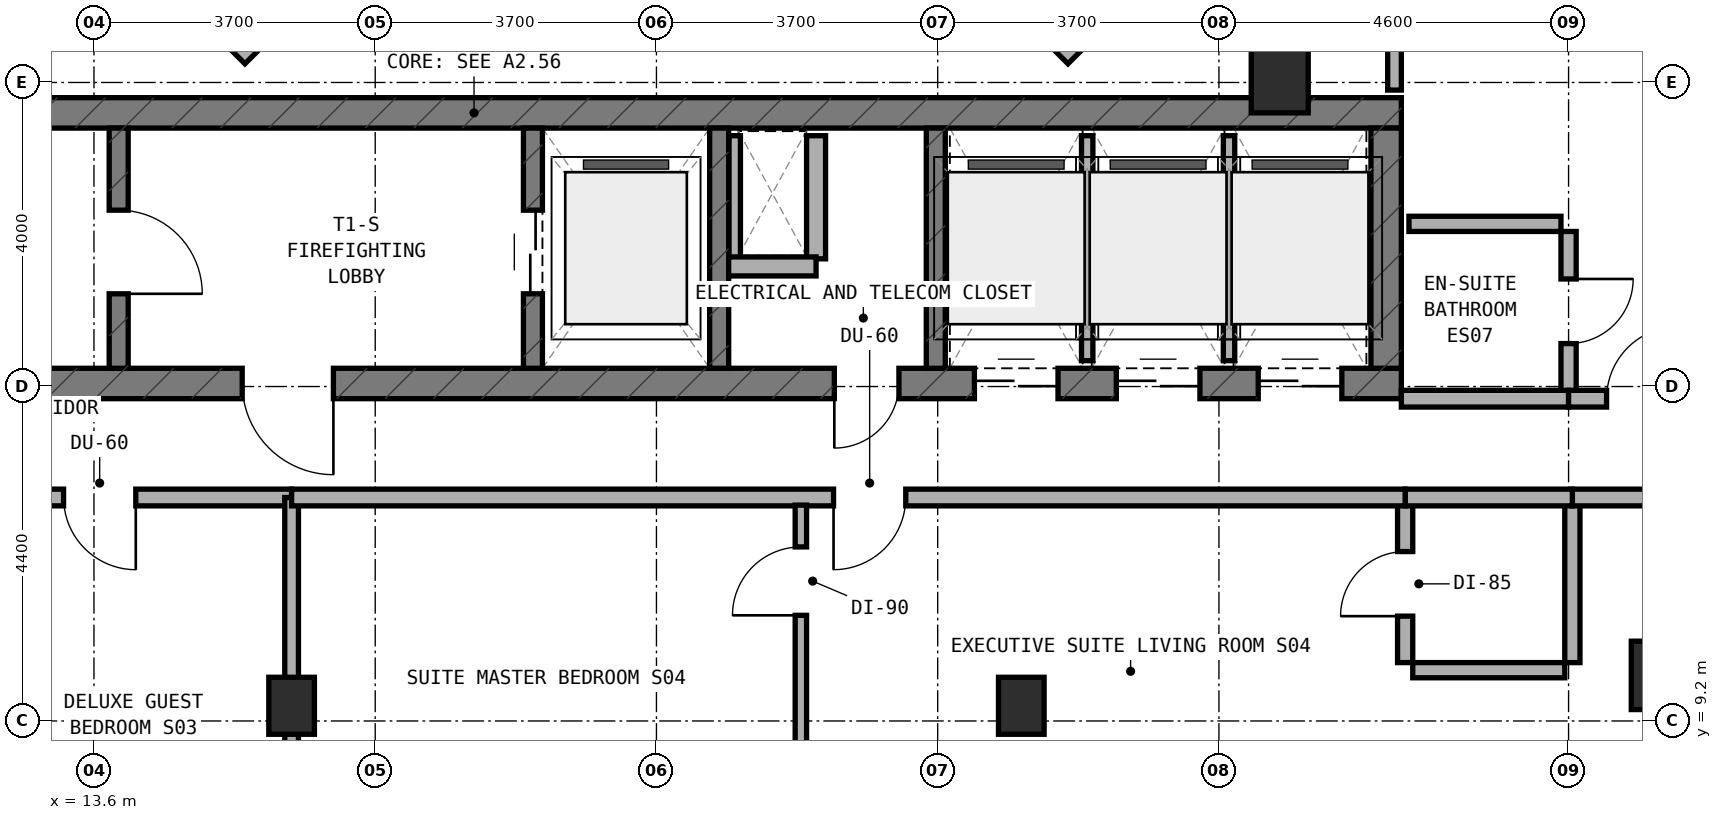
"""IFC4 building model, lengths in metres.
Left out: names, types, materials, properties, quantities, classifications, styles, units other than length and angle.
Written with IfcOpenShell. Run it as: python <this file> out.ifc"""

import sys

from ifc_helpers import new_model, si_unit, direction, frame, frame_2d, origin, origin_2d, place, context, subcontext, project, spatial, rectangle, extrude, element, fill, save


model = new_model("IFC4")
c1 = context("Model", 3, precision=1e-05, world=origin(), true_north=direction((0.0, 1.0)))
c2 = subcontext(c1, "Body", "Model", "MODEL_VIEW")
j1 = project(units=[si_unit("LENGTHUNIT", "METRE"), si_unit("PLANEANGLEUNIT", "RADIAN")], contexts=[c1])
p1 = place(None, origin())
s1 = spatial("IfcSite", under=j1, at=p1, CompositionType="ELEMENT")
p2 = place(p1, origin())
s2 = spatial("IfcBuilding", under=s1, at=p2, CompositionType="ELEMENT")
p3 = place(p2, frame((0.0, 0.0, 257.6)))
s3 = spatial("IfcBuildingStorey", under=s2, at=p3, CompositionType="ELEMENT", Elevation=257.6)
p4 = place(p3, frame((6.4, 13.64, 0.0), z_axis=(0.0, 0.0, 1.0), x_axis=(1.0, 0.0, 0.0)))
e1 = element("IfcWall", 1, at=p4, inside=s3, PredefinedType="SHEAR", context=c2, shape_type="SweptSolid", body=[
    extrude(rectangle(XDim=24.4, YDim=0.4, at=frame_2d((12.2, 0.0))), origin(), (0.0, 0.0, 1.0), 3.6),
])
p5 = place(p4, frame((9.15, 0.0, 0.0)))
e2 = element("IfcOpeningElement", 2, at=p5, cuts=e1, PredefinedType="OPENING", context=c2, shape_type="SweptSolid", body=[
    extrude(rectangle(XDim=1.2, YDim=2.15, at=frame_2d((0.6, 1.075))), frame((0.0, 0.21, 0.0), z_axis=(0.0, -1.0, 0.0), x_axis=(1.0, 0.0, 0.0)), (0.0, 0.0, 1.0), 0.42),
])
p6 = place(p4, frame((16.94, 0.0, 0.0)))
e3 = element("IfcOpeningElement", 3, at=p6, cuts=e1, PredefinedType="OPENING", context=c2, shape_type="SweptSolid", body=[
    extrude(rectangle(XDim=0.85, YDim=2.1, at=frame_2d((0.425, 1.05))), frame((0.0, 0.21, 0.0), z_axis=(0.0, -1.0, 0.0), x_axis=(1.0, 0.0, 0.0)), (0.0, 0.0, 1.0), 0.42),
])
p7 = place(p4, frame((18.783, 0.0, 0.0)))
e4 = element("IfcOpeningElement", 4, at=p7, cuts=e1, PredefinedType="OPENING", context=c2, shape_type="SweptSolid", body=[
    extrude(rectangle(XDim=1.1, YDim=2.15, at=frame_2d((0.55, 1.075))), frame((0.0, 0.21, 0.0), z_axis=(0.0, -1.0, 0.0), x_axis=(1.0, 0.0, 0.0)), (0.0, 0.0, 1.0), 0.42),
])
p8 = place(p4, frame((20.65, 0.0, 0.0)))
e5 = element("IfcOpeningElement", 5, at=p8, cuts=e1, PredefinedType="OPENING", context=c2, shape_type="SweptSolid", body=[
    extrude(rectangle(XDim=1.1, YDim=2.15, at=frame_2d((0.55, 1.075))), frame((0.0, 0.21, 0.0), z_axis=(0.0, -1.0, 0.0), x_axis=(1.0, 0.0, 0.0)), (0.0, 0.0, 1.0), 0.42),
])
p9 = place(p4, frame((22.517, 0.0, 0.0)))
e6 = element("IfcOpeningElement", 6, at=p9, cuts=e1, PredefinedType="OPENING", context=c2, shape_type="SweptSolid", body=[
    extrude(rectangle(XDim=1.1, YDim=2.15, at=frame_2d((0.55, 1.075))), frame((0.0, 0.21, 0.0), z_axis=(0.0, -1.0, 0.0), x_axis=(1.0, 0.0, 0.0)), (0.0, 0.0, 1.0), 0.42),
])
p10 = place(p3, frame((6.4, 17.2, 0.0), z_axis=(0.0, 0.0, 1.0), x_axis=(1.0, 0.0, 0.0)))
e7 = element("IfcWall", 7, at=p10, inside=s3, PredefinedType="SHEAR", context=c2, shape_type="SweptSolid", body=[
    extrude(rectangle(XDim=24.4, YDim=0.4, at=frame_2d((12.2, 0.0))), origin(), (0.0, 0.0, 1.0), 3.6),
])
p11 = place(p3, frame((30.6, 13.84, 0.0), z_axis=(0.0, 0.0, 1.0), x_axis=(0.0, 1.0, 0.0)))
e8 = element("IfcWall", 8, at=p11, inside=s3, PredefinedType="SHEAR", context=c2, shape_type="SweptSolid", body=[
    extrude(rectangle(XDim=3.16, YDim=0.4, at=frame_2d((1.58, 0.0))), origin(), (0.0, 0.0, 1.0), 3.6),
])
p12 = place(p3, frame((13.925, 13.84, 0.0), z_axis=(0.0, 0.0, 1.0), x_axis=(0.0, 1.0, 0.0)))
e9 = element("IfcWall", 9, at=p12, inside=s3, PredefinedType="STANDARD", context=c2, shape_type="SweptSolid", body=[
    extrude(rectangle(XDim=3.16, YDim=0.25, at=frame_2d((1.58, 0.0))), origin(), (0.0, 0.0, 1.0), 3.32),
])
p13 = place(p12, frame((0.98, 0.0, 0.0)))
e10 = element("IfcOpeningElement", 10, at=p13, cuts=e9, PredefinedType="OPENING", context=c2, shape_type="SweptSolid", body=[
    extrude(rectangle(XDim=1.1, YDim=2.15, at=frame_2d((0.55, 1.075))), frame((0.0, 0.135, 0.0), z_axis=(0.0, -1.0, 0.0), x_axis=(1.0, 0.0, 0.0)), (0.0, 0.0, 1.0), 0.27),
])
p14 = place(p3, frame((19.375, 13.84, 0.0), z_axis=(0.0, 0.0, 1.0), x_axis=(0.0, 1.0, 0.0)))
e11 = element("IfcWall", 11, at=p14, inside=s3, PredefinedType="STANDARD", context=c2, shape_type="SweptSolid", body=[
    extrude(rectangle(XDim=3.16, YDim=0.25, at=frame_2d((1.58, 0.0))), origin(), (0.0, 0.0, 1.0), 3.32),
])
p15 = place(p14, frame((0.98, 0.0, 0.0)))
e12 = element("IfcOpeningElement", 12, at=p15, cuts=e11, PredefinedType="OPENING", context=c2, shape_type="SweptSolid", body=[
    extrude(rectangle(XDim=1.1, YDim=2.15, at=frame_2d((0.55, 1.075))), frame((0.0, 0.135, 0.0), z_axis=(0.0, -1.0, 0.0), x_axis=(1.0, 0.0, 0.0)), (0.0, 0.0, 1.0), 0.27),
])
for number, where, z_axis, x_axis in (
    (13, (21.825, 13.84, 0.0), (0.0, 0.0, 1.0), (0.0, 1.0, 0.0)),
    (14, (24.675, 13.84, 0.0), (0.0, 0.0, 1.0), (0.0, 1.0, 0.0)),
):
    element("IfcWall", number, at=place(p3, frame(where, z_axis=z_axis, x_axis=x_axis)), inside=s3, PredefinedType="STANDARD", context=c2, shape_type="SweptSolid", body=[
        extrude(rectangle(XDim=3.16, YDim=0.25, at=frame_2d((1.58, 0.0))), origin(), (0.0, 0.0, 1.0), 3.32),
    ])
for number, where, z_axis, x_axis in (
    (15, (16.2, 9.4, 0.0), (0.0, 0.0, 1.0), (1.0, 0.0, 0.0)),
    (16, (25.8, 9.4, 0.0), (0.0, 0.0, 1.0), (1.0, 0.0, 0.0)),
):
    element("IfcColumn", number, at=place(p3, frame(where, z_axis=z_axis, x_axis=x_axis)), inside=s3, PredefinedType="COLUMN", context=c2, shape_type="SweptSolid", body=[
        extrude(rectangle(XDim=0.6, YDim=0.75, at=origin_2d()), origin(), (0.0, 0.0, 1.0), 3.6),
    ])
for number, where, z_axis, x_axis in (
    (17, (34.2, 9.8, 0.0), (0.0, 0.0, 1.0), (1.0, 0.0, 0.0)),
    (18, (29.2, 17.65, 0.0), (0.0, 0.0, 1.0), (1.0, 0.0, 0.0)),
):
    element("IfcColumn", number, at=place(p3, frame(where, z_axis=z_axis, x_axis=x_axis)), inside=s3, PredefinedType="COLUMN", context=c2, shape_type="SweptSolid", body=[
        extrude(rectangle(XDim=0.75, YDim=0.9, at=origin_2d()), origin(), (0.0, 0.0, 1.0), 3.6),
    ])
p16 = place(p3, frame((33.875, 8.728, 0.0), z_axis=(0.0, 0.0, 1.0), x_axis=(0.99139921394, 0.130872451645, 0.0)))
e19 = element("IfcWall", 19, at=p16, inside=s3, PredefinedType="STANDARD", context=c2, shape_type="SweptSolid", body=[
    extrude(rectangle(XDim=0.756, YDim=0.26, at=frame_2d((0.378, 0.0))), origin(), (0.0, 0.0, 1.0), 3.32),
])
for number, where, z_axis, x_axis in (
    (20, (26.322, 17.938, 0.0), (0.0, 0.0, 1.0), (0.707, 0.707, 0.0)),
    (21, (14.044, 19.572, 0.0), (0.0, 0.0, 1.0), (0.707, -0.707, 0.0)),
):
    element("IfcWall", number, at=place(p3, frame(where, z_axis=z_axis, x_axis=x_axis)), inside=s3, PredefinedType="STANDARD", context=c2, shape_type="SweptSolid", body=[
        extrude(rectangle(XDim=2.311, YDim=0.26, at=frame_2d((1.155, 0.0))), origin(), (0.0, 0.0, 1.0), 3.32),
    ])
p17 = place(p3, frame((22.03, 15.28, 0.0), z_axis=(0.0, 0.0, 1.0), x_axis=(0.0, 1.0, 0.0)))
e22 = element("IfcWall", 22, at=p17, inside=s3, PredefinedType="PARTITIONING", context=c2, shape_type="SweptSolid", body=[
    extrude(rectangle(XDim=1.62, YDim=0.15, at=frame_2d((0.81, 0.0))), origin(), (0.0, 0.0, 1.0), 3.32),
])
p18 = place(p3, frame((23.1, 15.28, 0.0), z_axis=(0.0, 0.0, 1.0), x_axis=(0.0, 1.0, 0.0)))
e23 = element("IfcWall", 23, at=p18, inside=s3, PredefinedType="SOLIDWALL", context=c2, shape_type="SweptSolid", body=[
    extrude(rectangle(XDim=1.62, YDim=0.25, at=frame_2d((0.81, 0.0))), origin(), (0.0, 0.0, 1.0), 3.32),
])
p19 = place(p3, frame((21.95, 15.18, 0.0), z_axis=(0.0, 0.0, 1.0), x_axis=(1.0, 0.0, 0.0)))
e24 = element("IfcWall", 24, at=p19, inside=s3, PredefinedType="SOLIDWALL", context=c2, shape_type="SweptSolid", body=[
    extrude(rectangle(XDim=1.15, YDim=0.25, at=frame_2d((0.575, 0.0))), origin(), (0.0, 0.0, 1.0), 3.32),
])
p20 = place(p3, frame((26.667, 13.94, 0.0), z_axis=(0.0, 0.0, 1.0), x_axis=(0.0, 1.0, 0.0)))
e25 = element("IfcWall", 25, at=p20, inside=s3, PredefinedType="PARTITIONING", context=c2, shape_type="SweptSolid", body=[
    extrude(rectangle(XDim=2.96, YDim=0.15, at=frame_2d((1.48, 0.0))), origin(), (0.0, 0.0, 1.0), 3.32),
])
p21 = place(p3, frame((28.533, 13.94, 0.0), z_axis=(0.0, 0.0, 1.0), x_axis=(0.0, 1.0, 0.0)))
e26 = element("IfcWall", 26, at=p21, inside=s3, PredefinedType="PARTITIONING", context=c2, shape_type="SweptSolid", body=[
    extrude(rectangle(XDim=2.96, YDim=0.15, at=frame_2d((1.48, 0.0))), origin(), (0.0, 0.0, 1.0), 2.795),
])
p22 = place(p3, frame((11.15, 12.14, 0.0), z_axis=(0.0, 0.0, 1.0), x_axis=(1.0, 0.0, 0.0)))
e27 = element("IfcWall", 27, at=p22, inside=s3, PredefinedType="SOLIDWALL", context=c2, shape_type="SweptSolid", body=[
    extrude(rectangle(XDim=5.05, YDim=0.22, at=frame_2d((2.525, 0.0))), origin(), (0.0, 0.0, 1.0), 2.795),
])
p23 = place(p22, frame((2.05, 0.0, 0.0)))
e28 = element("IfcOpeningElement", 28, at=p23, cuts=e27, PredefinedType="OPENING", context=c2, shape_type="SweptSolid", body=[
    extrude(rectangle(XDim=0.95, YDim=2.1, at=frame_2d((0.475, 1.05))), frame((0.0, 0.12, 0.0), z_axis=(0.0, -1.0, 0.0), x_axis=(1.0, 0.0, 0.0)), (0.0, 0.0, 1.0), 0.24),
])
p24 = place(p3, frame((16.2, 7.26, 0.0), z_axis=(0.0, 0.0, 1.0), x_axis=(0.0, 1.0, 0.0)))
e29 = element("IfcWall", 29, at=p24, inside=s3, PredefinedType="SOLIDWALL", context=c2, shape_type="SweptSolid", body=[
    extrude(rectangle(XDim=4.88, YDim=0.18, at=frame_2d((2.44, 0.0))), origin(), (0.0, 0.0, 1.0), 2.795),
])
p25 = place(p3, frame((30.85, 9.968, 0.0), z_axis=(0.0, 0.0, 1.0), x_axis=(0.0, 1.0, 0.0)))
e30 = element("IfcWall", 30, at=p25, inside=s3, PredefinedType="PLUMBINGWALL", context=c2, shape_type="SweptSolid", body=[
    extrude(rectangle(XDim=2.072, YDim=0.2, at=frame_2d((1.036, 0.0))), origin(), (0.0, 0.0, 1.0), 2.895),
])
p26 = place(p25, frame((0.611, 0.0, 0.0)))
e31 = element("IfcOpeningElement", 31, at=p26, cuts=e30, PredefinedType="OPENING", context=c2, shape_type="SweptSolid", body=[
    extrude(rectangle(XDim=0.85, YDim=2.1, at=frame_2d((0.425, 1.05))), frame((0.0, 0.11, 0.0), z_axis=(0.0, -1.0, 0.0), x_axis=(1.0, 0.0, 0.0)), (0.0, 0.0, 1.0), 0.22),
])
p27 = place(p3, frame((30.95, 9.868, 0.0), z_axis=(0.0, 0.0, 1.0), x_axis=(1.0, 0.0, 0.0)))
e32 = element("IfcWall", 32, at=p27, inside=s3, PredefinedType="PLUMBINGWALL", context=c2, shape_type="SweptSolid", body=[
    extrude(rectangle(XDim=2.0, YDim=0.2, at=frame_2d((1.0, 0.0))), origin(), (0.0, 0.0, 1.0), 3.015),
])
p28 = place(p3, frame((33.05, 9.968, 0.0), z_axis=(0.0, 0.0, 1.0), x_axis=(0.0, 1.0, 0.0)))
e33 = element("IfcWall", 33, at=p28, inside=s3, PredefinedType="PLUMBINGWALL", context=c2, shape_type="SweptSolid", body=[
    extrude(rectangle(XDim=2.072, YDim=0.2, at=frame_2d((1.036, 0.0))), origin(), (0.0, 0.0, 1.0), 2.895),
])
p29 = place(p3, frame((33.05, 12.14, 0.0), z_axis=(0.0, 0.0, 1.0), x_axis=(1.0, 0.0, 0.0)))
e34 = element("IfcWall", 34, at=p29, inside=s3, PredefinedType="SOLIDWALL", context=c2, shape_type="SweptSolid", body=[
    extrude(rectangle(XDim=4.99, YDim=0.22, at=frame_2d((2.495, 0.0))), origin(), (0.0, 0.0, 1.0), 2.795),
])
p30 = place(p3, frame((30.85, 12.14, 0.0), z_axis=(0.0, 0.0, 1.0), x_axis=(1.0, 0.0, 0.0)))
e35 = element("IfcWall", 35, at=p30, inside=s3, PredefinedType="SOLIDWALL", context=c2, shape_type="SweptSolid", body=[
    extrude(rectangle(XDim=2.2, YDim=0.22, at=frame_2d((1.1, 0.0))), origin(), (0.0, 0.0, 1.0), 3.32),
])
p31 = place(p3, frame((16.2, 12.14, 0.0), z_axis=(0.0, 0.0, 1.0), x_axis=(1.0, 0.0, 0.0)))
e36 = element("IfcWall", 36, at=p31, inside=s3, PredefinedType="SOLIDWALL", context=c2, shape_type="SweptSolid", body=[
    extrude(rectangle(XDim=14.65, YDim=0.22, at=frame_2d((7.325, 0.0))), origin(), (0.0, 0.0, 1.0), 2.795),
])
p32 = place(p31, frame((7.13, 0.0, 0.0)))
e37 = element("IfcOpeningElement", 37, at=p32, cuts=e36, PredefinedType="OPENING", context=c2, shape_type="SweptSolid", body=[
    extrude(rectangle(XDim=0.95, YDim=2.1, at=frame_2d((0.475, 1.05))), frame((0.0, 0.12, 0.0), z_axis=(0.0, -1.0, 0.0), x_axis=(1.0, 0.0, 0.0)), (0.0, 0.0, 1.0), 0.24),
])
p33 = place(p3, frame((22.9, 7.36, 0.0), z_axis=(0.0, 0.0, 1.0), x_axis=(0.0, 1.0, 0.0)))
e38 = element("IfcWall", 38, at=p33, inside=s3, PredefinedType="PARTITIONING", context=c2, shape_type="SweptSolid", body=[
    extrude(rectangle(XDim=4.68, YDim=0.15, at=frame_2d((2.34, 0.0))), origin(), (0.0, 0.0, 1.0), 2.895),
])
p34 = place(p33, frame((3.23, 0.0, 0.0)))
e39 = element("IfcOpeningElement", 39, at=p34, cuts=e38, PredefinedType="OPENING", context=c2, shape_type="SweptSolid", body=[
    extrude(rectangle(XDim=0.9, YDim=2.1, at=frame_2d((0.45, 1.05))), frame((0.0, 0.085, 0.0), z_axis=(0.0, -1.0, 0.0), x_axis=(1.0, 0.0, 0.0)), (0.0, 0.0, 1.0), 0.17),
])
p35 = place(p3, frame((30.71, 17.5, 0.0), z_axis=(0.0, 0.0, 1.0), x_axis=(0.0, 1.0, 0.0)))
e40 = element("IfcWall", 40, at=p35, inside=s3, PredefinedType="SOLIDWALL", context=c2, shape_type="SweptSolid", body=[
    extrude(rectangle(XDim=15.0, YDim=0.18, at=frame_2d((7.5, 0.0))), origin(), (0.0, 0.0, 1.0), 2.795),
])
p36 = place(p3, frame((33.0, 13.54, 0.0), z_axis=(0.0, 0.0, 1.0), x_axis=(0.0, 1.0, 0.0)))
e41 = element("IfcWall", 41, at=p36, inside=s3, PredefinedType="PLUMBINGWALL", context=c2, shape_type="SweptSolid", body=[
    extrude(rectangle(XDim=2.1, YDim=0.2, at=frame_2d((1.05, 0.0))), origin(), (0.0, 0.0, 1.0), 3.32),
])
p37 = place(p36, frame((0.625, 0.0, 0.0)))
e42 = element("IfcOpeningElement", 42, at=p37, cuts=e41, PredefinedType="OPENING", context=c2, shape_type="SweptSolid", body=[
    extrude(rectangle(XDim=0.85, YDim=2.1, at=frame_2d((0.425, 1.05))), frame((0.0, 0.11, 0.0), z_axis=(0.0, -1.0, 0.0), x_axis=(1.0, 0.0, 0.0)), (0.0, 0.0, 1.0), 0.22),
])
p38 = place(p3, frame((30.9, 15.74, 0.0), z_axis=(0.0, 0.0, 1.0), x_axis=(1.0, 0.0, 0.0)))
e43 = element("IfcWall", 43, at=p38, inside=s3, PredefinedType="PLUMBINGWALL", context=c2, shape_type="SweptSolid", body=[
    extrude(rectangle(XDim=2.0, YDim=0.2, at=frame_2d((1.0, 0.0))), origin(), (0.0, 0.0, 1.0), 3.32),
])
p39 = place(p3, frame((30.8, 13.44, 0.0), z_axis=(0.0, 0.0, 1.0), x_axis=(1.0, 0.0, 0.0)))
e44 = element("IfcWall", 44, at=p39, inside=s3, PredefinedType="SOLIDWALL", context=c2, shape_type="SweptSolid", body=[
    extrude(rectangle(XDim=2.2, YDim=0.22, at=frame_2d((1.1, 0.0))), origin(), (0.0, 0.0, 1.0), 3.32),
])
p40 = place(p3, frame((33.0, 13.44, 0.0), z_axis=(0.0, 0.0, 1.0), x_axis=(1.0, 0.0, 0.0)))
e45 = element("IfcWall", 45, at=p40, inside=s3, PredefinedType="SOLIDWALL", context=c2, shape_type="SweptSolid", body=[
    extrude(rectangle(XDim=5.2, YDim=0.22, at=frame_2d((2.6, 0.0))), origin(), (0.0, 0.0, 1.0), 2.795),
])
p41 = place(p40, frame((0.5, 0.0, 0.0)))
e46 = element("IfcOpeningElement", 46, at=p41, cuts=e45, PredefinedType="OPENING", context=c2, shape_type="SweptSolid", body=[
    extrude(rectangle(XDim=0.95, YDim=2.1, at=frame_2d((0.475, 1.05))), frame((0.0, 0.12, 0.0), z_axis=(0.0, -1.0, 0.0), x_axis=(1.0, 0.0, 0.0)), (0.0, 0.0, 1.0), 0.24),
])
p42 = place(p13, frame((1.1, 0.0, 0.0), z_axis=(0.0, 0.0, 1.0), x_axis=(-1.0, 0.0, 0.0)))
e47 = element("IfcDoor", 47, at=p42, inside=s3, OperationType="SINGLE_SWING_RIGHT", PredefinedType="DOOR", context=c2, shape_type="SweptSolid", body=[
    extrude(rectangle(XDim=1.1, YDim=2.15, at=frame_2d((0.55, 1.075))), frame((0.0, 0.025, 0.0), z_axis=(0.0, -1.0, 0.0), x_axis=(1.0, 0.0, 0.0)), (0.0, 0.0, 1.0), 0.05),
])
fill(e10, e47)
p43 = place(p5, frame((1.2, 0.0, 0.0), z_axis=(0.0, 0.0, 1.0), x_axis=(-1.0, 0.0, 0.0)))
e48 = element("IfcDoor", 48, at=p43, inside=s3, OperationType="SINGLE_SWING_LEFT", PredefinedType="DOOR", context=c2, shape_type="SweptSolid", body=[
    extrude(rectangle(XDim=1.2, YDim=2.15, at=frame_2d((0.6, 1.075))), frame((0.0, 0.025, 0.0), z_axis=(0.0, -1.0, 0.0), x_axis=(1.0, 0.0, 0.0)), (0.0, 0.0, 1.0), 0.05),
])
fill(e2, e48)
p44 = place(p15, origin())
e49 = element("IfcDoor", 49, at=p44, inside=s3, OperationType="DOUBLE_DOOR_SLIDING", PredefinedType="DOOR", context=c2, shape_type="SweptSolid", body=[
    extrude(rectangle(XDim=1.1, YDim=2.15, at=frame_2d((0.55, 1.075))), frame((0.0, 0.025, 0.0), z_axis=(0.0, -1.0, 0.0), x_axis=(1.0, 0.0, 0.0)), (0.0, 0.0, 1.0), 0.05),
])
fill(e12, e49)
p45 = place(p6, frame((0.85, 0.0, 0.0), z_axis=(0.0, 0.0, 1.0), x_axis=(-1.0, 0.0, 0.0)))
e50 = element("IfcDoor", 50, at=p45, inside=s3, OperationType="SINGLE_SWING_RIGHT", PredefinedType="DOOR", context=c2, shape_type="SweptSolid", body=[
    extrude(rectangle(XDim=0.85, YDim=2.1, at=frame_2d((0.425, 1.05))), frame((0.0, 0.025, 0.0), z_axis=(0.0, -1.0, 0.0), x_axis=(1.0, 0.0, 0.0)), (0.0, 0.0, 1.0), 0.05),
])
fill(e3, e50)
p46 = place(p7, frame((1.1, 0.0, 0.0), z_axis=(0.0, 0.0, 1.0), x_axis=(-1.0, 0.0, 0.0)))
e51 = element("IfcDoor", 51, at=p46, inside=s3, OperationType="DOUBLE_DOOR_SLIDING", PredefinedType="DOOR", context=c2, shape_type="SweptSolid", body=[
    extrude(rectangle(XDim=1.1, YDim=2.15, at=frame_2d((0.55, 1.075))), frame((0.0, 0.025, 0.0), z_axis=(0.0, -1.0, 0.0), x_axis=(1.0, 0.0, 0.0)), (0.0, 0.0, 1.0), 0.05),
])
fill(e4, e51)
p47 = place(p8, frame((1.1, 0.0, 0.0), z_axis=(0.0, 0.0, 1.0), x_axis=(-1.0, 0.0, 0.0)))
e52 = element("IfcDoor", 52, at=p47, inside=s3, OperationType="DOUBLE_DOOR_SLIDING", PredefinedType="DOOR", context=c2, shape_type="SweptSolid", body=[
    extrude(rectangle(XDim=1.1, YDim=2.15, at=frame_2d((0.55, 1.075))), frame((0.0, 0.025, 0.0), z_axis=(0.0, -1.0, 0.0), x_axis=(1.0, 0.0, 0.0)), (0.0, 0.0, 1.0), 0.05),
])
fill(e5, e52)
p48 = place(p9, frame((1.1, 0.0, 0.0), z_axis=(0.0, 0.0, 1.0), x_axis=(-1.0, 0.0, 0.0)))
e53 = element("IfcDoor", 53, at=p48, inside=s3, OperationType="DOUBLE_DOOR_SLIDING", PredefinedType="DOOR", context=c2, shape_type="SweptSolid", body=[
    extrude(rectangle(XDim=1.1, YDim=2.15, at=frame_2d((0.55, 1.075))), frame((0.0, 0.025, 0.0), z_axis=(0.0, -1.0, 0.0), x_axis=(1.0, 0.0, 0.0)), (0.0, 0.0, 1.0), 0.05),
])
fill(e6, e53)
p49 = place(p23, frame((0.95, 0.0, 0.0), z_axis=(0.0, 0.0, 1.0), x_axis=(-1.0, 0.0, 0.0)))
e54 = element("IfcDoor", 54, at=p49, inside=s3, OperationType="SINGLE_SWING_LEFT", PredefinedType="DOOR", context=c2, shape_type="SweptSolid", body=[
    extrude(rectangle(XDim=0.95, YDim=2.1, at=frame_2d((0.475, 1.05))), frame((0.0, 0.025, 0.0), z_axis=(0.0, -1.0, 0.0), x_axis=(1.0, 0.0, 0.0)), (0.0, 0.0, 1.0), 0.05),
])
fill(e28, e54)
p50 = place(p26, origin())
e55 = element("IfcDoor", 55, at=p50, inside=s3, OperationType="SINGLE_SWING_LEFT", PredefinedType="DOOR", context=c2, shape_type="SweptSolid", body=[
    extrude(rectangle(XDim=0.85, YDim=2.1, at=frame_2d((0.425, 1.05))), frame((0.0, 0.025, 0.0), z_axis=(0.0, -1.0, 0.0), x_axis=(1.0, 0.0, 0.0)), (0.0, 0.0, 1.0), 0.05),
])
fill(e31, e55)
p51 = place(p32, frame((0.95, 0.0, 0.0), z_axis=(0.0, 0.0, 1.0), x_axis=(-1.0, 0.0, 0.0)))
e56 = element("IfcDoor", 56, at=p51, inside=s3, OperationType="SINGLE_SWING_RIGHT", PredefinedType="DOOR", context=c2, shape_type="SweptSolid", body=[
    extrude(rectangle(XDim=0.95, YDim=2.1, at=frame_2d((0.475, 1.05))), frame((0.0, 0.025, 0.0), z_axis=(0.0, -1.0, 0.0), x_axis=(1.0, 0.0, 0.0)), (0.0, 0.0, 1.0), 0.05),
])
fill(e37, e56)
p52 = place(p34, origin())
e57 = element("IfcDoor", 57, at=p52, inside=s3, OperationType="SINGLE_SWING_LEFT", PredefinedType="DOOR", context=c2, shape_type="SweptSolid", body=[
    extrude(rectangle(XDim=0.9, YDim=2.1, at=frame_2d((0.45, 1.05))), frame((0.0, 0.025, 0.0), z_axis=(0.0, -1.0, 0.0), x_axis=(1.0, 0.0, 0.0)), (0.0, 0.0, 1.0), 0.05),
])
fill(e39, e57)
p53 = place(p37, frame((0.85, 0.0, 0.0), z_axis=(0.0, 0.0, 1.0), x_axis=(-1.0, 0.0, 0.0)))
e58 = element("IfcDoor", 58, at=p53, inside=s3, OperationType="SINGLE_SWING_LEFT", PredefinedType="DOOR", context=c2, shape_type="SweptSolid", body=[
    extrude(rectangle(XDim=0.85, YDim=2.1, at=frame_2d((0.425, 1.05))), frame((0.0, 0.025, 0.0), z_axis=(0.0, -1.0, 0.0), x_axis=(1.0, 0.0, 0.0)), (0.0, 0.0, 1.0), 0.05),
])
fill(e42, e58)
p54 = place(p41, origin())
e59 = element("IfcDoor", 59, at=p54, inside=s3, OperationType="SINGLE_SWING_RIGHT", PredefinedType="DOOR", context=c2, shape_type="SweptSolid", body=[
    extrude(rectangle(XDim=0.95, YDim=2.1, at=frame_2d((0.475, 1.05))), frame((0.0, 0.025, 0.0), z_axis=(0.0, -1.0, 0.0), x_axis=(1.0, 0.0, 0.0)), (0.0, 0.0, 1.0), 0.05),
])
fill(e46, e59)
save(model, sys.argv[1])
